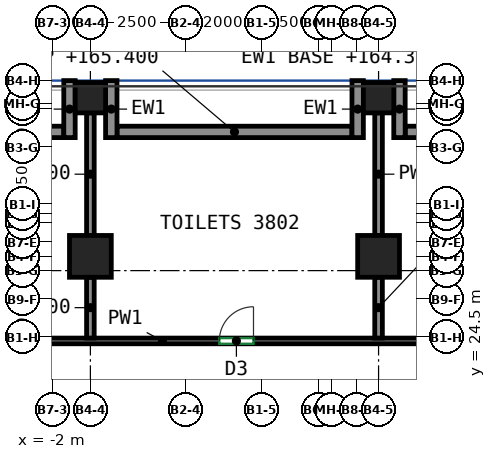
"""IFC4 building model, lengths in metres.
Left out: names, types, materials, properties, quantities, classifications, styles, units other than length and angle.
Written with IfcOpenShell. Run it as: python <this file> out.ifc"""

import sys

from ifc_helpers import new_model, si_unit, direction, frame, frame_2d, origin, origin_2d, place, context, subcontext, project, spatial, rectangle, extrude, source, transform, mapped, element, fill, save


model = new_model("IFC4")
c1 = context("Model", 3, precision=1e-05, world=origin(), true_north=direction((0.0, 1.0)))
c2 = subcontext(c1, "Body", "Model", "MODEL_VIEW")
j1 = project(units=[si_unit("LENGTHUNIT", "METRE"), si_unit("PLANEANGLEUNIT", "RADIAN")], contexts=[c1])
p1 = place(None, origin())
s1 = spatial("IfcSite", under=j1, at=p1, CompositionType="ELEMENT")
p2 = place(p1, origin())
s2 = spatial("IfcBuilding", under=s1, at=p2, CompositionType="ELEMENT")
p3 = place(p2, frame((0.0, 0.0, 164.3)))
s3 = spatial("IfcBuildingStorey", under=s2, at=p3, CompositionType="ELEMENT", Elevation=164.3)
m1 = source(origin(), c2, "Body", "SweptSolid", [
    extrude(rectangle(XDim=1.1, YDim=1.1, at=origin_2d()), origin(), (0.0, 0.0, 1.0), 2.3),
])
p4 = place(p3, frame((-1.0, 26.625, 0.0), z_axis=(0.0, 0.0, 1.0), x_axis=(1.0, 0.0, 0.0)))
e1 = element("IfcColumn", 1, at=p4, inside=s3, PredefinedType="COLUMN", context=c2, shape_type="MappedRepresentation", body=[
    mapped(m1, transform((0.0, 0.0, 0.0))),
])
m2 = source(origin(), c2, "Body", "SweptSolid", [
    extrude(rectangle(XDim=0.8, YDim=0.8, at=origin_2d()), origin(), (0.0, 0.0, 1.0), 2.3),
])
p5 = place(p3, frame((-1.0, 30.8, 0.0), z_axis=(0.0, 0.0, 1.0), x_axis=(1.0, 0.0, 0.0)))
e2 = element("IfcColumn", 2, at=p5, inside=s3, PredefinedType="COLUMN", context=c2, shape_type="MappedRepresentation", body=[
    mapped(m2, transform((0.0, 0.0, 0.0))),
])
p6 = place(p3, frame((6.583, 26.625, 0.0), z_axis=(0.0, 0.0, 1.0), x_axis=(1.0, 0.0, 0.0)))
e3 = element("IfcColumn", 3, at=p6, inside=s3, PredefinedType="COLUMN", context=c2, shape_type="MappedRepresentation", body=[
    mapped(m1, transform((0.0, 0.0, 0.0))),
])
p7 = place(p3, frame((6.583, 30.8, 0.0), z_axis=(0.0, 0.0, 1.0), x_axis=(1.0, 0.0, 0.0)))
e4 = element("IfcColumn", 4, at=p7, inside=s3, PredefinedType="COLUMN", context=c2, shape_type="MappedRepresentation", body=[
    mapped(m2, transform((0.0, 0.0, 0.0))),
])
m3 = source(origin(), c2, "Body", "SweptSolid", [
    extrude(rectangle(XDim=6.184, YDim=0.3, at=frame_2d((3.092, 0.0))), origin(), (0.0, 0.0, 1.0), 1.1),
])
p8 = place(p3, frame((13.467, 29.9, 0.0), z_axis=(0.0, 0.0, 1.0), x_axis=(-1.0, 0.0, 0.0)))
e5 = element("IfcWall", 5, at=p8, inside=s3, PredefinedType="SOLIDWALL", context=c2, shape_type="MappedRepresentation", body=[
    mapped(m3, transform((0.0, 0.0, 0.0))),
])
m4 = source(origin(), c2, "Body", "SweptSolid", [
    extrude(rectangle(XDim=1.5, YDim=0.3, at=frame_2d((0.75, 0.0))), origin(), (0.0, 0.0, 1.0), 2.3),
])
p9 = place(p3, frame((7.133, 31.25, 0.0), z_axis=(0.0, 0.0, 1.0), x_axis=(0.0, -1.0, 0.0)))
e6 = element("IfcWall", 6, at=p9, inside=s3, PredefinedType="SOLIDWALL", context=c2, shape_type="MappedRepresentation", body=[
    mapped(m4, transform((0.0, 0.0, 0.0))),
])
m5 = source(origin(), c2, "Body", "SweptSolid", [
    extrude(rectangle(XDim=6.183, YDim=0.3, at=frame_2d((3.092, 0.0))), origin(), (0.0, 0.0, 1.0), 1.1),
])
p10 = place(p3, frame((5.883, 29.9, 0.0), z_axis=(0.0, 0.0, 1.0), x_axis=(-1.0, 0.0, 0.0)))
e7 = element("IfcWall", 7, at=p10, inside=s3, PredefinedType="SOLIDWALL", context=c2, shape_type="MappedRepresentation", body=[
    mapped(m5, transform((0.0, 0.0, 0.0))),
])
for number, where, z_axis, x_axis in (
    (8, (6.033, 31.25, 0.0), (0.0, 0.0, 1.0), (0.0, -1.0, 0.0)),
    (9, (-0.45, 31.25, 0.0), (0.0, 0.0, 1.0), (0.0, -1.0, 0.0)),
):
    element("IfcWall", number, at=place(p3, frame(where, z_axis=z_axis, x_axis=x_axis)), inside=s3, PredefinedType="SOLIDWALL", context=c2, shape_type="MappedRepresentation", body=[
        mapped(m4, transform((0.0, 0.0, 0.0))),
    ])
p11 = place(p3, frame((-1.7, 29.9, 0.0), z_axis=(0.0, 0.0, 1.0), x_axis=(-1.0, 0.0, 0.0)))
e10 = element("IfcWall", 10, at=p11, inside=s3, PredefinedType="SOLIDWALL", context=c2, shape_type="MappedRepresentation", body=[
    mapped(m5, transform((0.0, 0.0, 0.0))),
])
p12 = place(p3, frame((-1.55, 31.25, 0.0), z_axis=(0.0, 0.0, 1.0), x_axis=(0.0, -1.0, 0.0)))
e11 = element("IfcWall", 11, at=p12, inside=s3, PredefinedType="SOLIDWALL", context=c2, shape_type="MappedRepresentation", body=[
    mapped(m4, transform((0.0, 0.0, 0.0))),
])
p13 = place(p3, frame((-20.034, 24.4, 0.0), z_axis=(0.0, 0.0, 1.0), x_axis=(1.0, 0.0, 0.0)))
e12 = element("IfcWall", 12, at=p13, inside=s3, PredefinedType="PARTITIONING", context=c2, shape_type="SweptSolid", body=[
    extrude(rectangle(XDim=41.859, YDim=0.15, at=frame_2d((20.929, 0.0))), origin(), (0.0, 0.0, 1.0), 3.8),
])
p14 = place(p13, frame((3.207, 0.0, 0.0)))
e13 = element("IfcOpeningElement", 13, at=p14, cuts=e12, PredefinedType="OPENING", context=c2, shape_type="SweptSolid", body=[
    extrude(rectangle(XDim=1.0, YDim=2.1, at=frame_2d((0.5, 1.05))), frame((0.0, 0.085, 0.0), z_axis=(0.0, -1.0, 0.0), x_axis=(1.0, 0.0, 0.0)), (0.0, 0.0, 1.0), 0.17),
])
p15 = place(p13, frame((22.426, 0.0, 0.0)))
e14 = element("IfcOpeningElement", 14, at=p15, cuts=e12, PredefinedType="OPENING", context=c2, shape_type="SweptSolid", body=[
    extrude(rectangle(XDim=0.9, YDim=2.1, at=frame_2d((0.45, 1.05))), frame((0.0, 0.085, 0.0), z_axis=(0.0, -1.0, 0.0), x_axis=(1.0, 0.0, 0.0)), (0.0, 0.0, 1.0), 0.17),
])
p16 = place(p13, frame((31.827, 0.0, 0.0)))
e15 = element("IfcOpeningElement", 15, at=p16, cuts=e12, PredefinedType="OPENING", context=c2, shape_type="SweptSolid", body=[
    extrude(rectangle(XDim=1.8, YDim=2.1, at=frame_2d((0.9, 1.05))), frame((0.0, 0.085, 0.0), z_axis=(0.0, -1.0, 0.0), x_axis=(1.0, 0.0, 0.0)), (0.0, 0.0, 1.0), 0.17),
])
p17 = place(p3, frame((6.583, 24.476, 0.0), z_axis=(0.0, 0.0, 1.0), x_axis=(0.0, 1.0, 0.0)))
e16 = element("IfcWall", 16, at=p17, inside=s3, PredefinedType="PARTITIONING", context=c2, shape_type="SweptSolid", body=[
    extrude(rectangle(XDim=1.599, YDim=0.2, at=frame_2d((0.799, 0.0))), origin(), (0.0, 0.0, 1.0), 2.3),
])
p18 = place(p3, frame((6.583, 27.175, 0.0), z_axis=(0.0, 0.0, 1.0), x_axis=(0.0, 1.0, 0.0)))
e17 = element("IfcWall", 17, at=p18, inside=s3, PredefinedType="PARTITIONING", context=c2, shape_type="SweptSolid", body=[
    extrude(rectangle(XDim=3.225, YDim=0.2, at=frame_2d((1.612, 0.0))), origin(), (0.0, 0.0, 1.0), 2.3),
])
p19 = place(p3, frame((-1.0, 24.476, 0.0), z_axis=(0.0, 0.0, 1.0), x_axis=(0.0, 1.0, 0.0)))
e18 = element("IfcWall", 18, at=p19, inside=s3, PredefinedType="PARTITIONING", context=c2, shape_type="SweptSolid", body=[
    extrude(rectangle(XDim=1.599, YDim=0.2, at=frame_2d((0.799, 0.0))), origin(), (0.0, 0.0, 1.0), 2.3),
])
p20 = place(p3, frame((-1.0, 27.175, 0.0), z_axis=(0.0, 0.0, 1.0), x_axis=(0.0, 1.0, 0.0)))
e19 = element("IfcWall", 19, at=p20, inside=s3, PredefinedType="PARTITIONING", context=c2, shape_type="SweptSolid", body=[
    extrude(rectangle(XDim=3.225, YDim=0.2, at=frame_2d((1.612, 0.0))), origin(), (0.0, 0.0, 1.0), 2.3),
])
p21 = place(p15, origin())
e20 = element("IfcDoor", 20, at=p21, inside=s3, OperationType="SINGLE_SWING_RIGHT", PredefinedType="DOOR", context=c2, shape_type="SweptSolid", body=[
    extrude(rectangle(XDim=0.9, YDim=2.1, at=frame_2d((0.45, 1.05))), frame((0.0, 0.025, 0.0), z_axis=(0.0, -1.0, 0.0), x_axis=(1.0, 0.0, 0.0)), (0.0, 0.0, 1.0), 0.05),
])
fill(e14, e20)
save(model, sys.argv[1])
